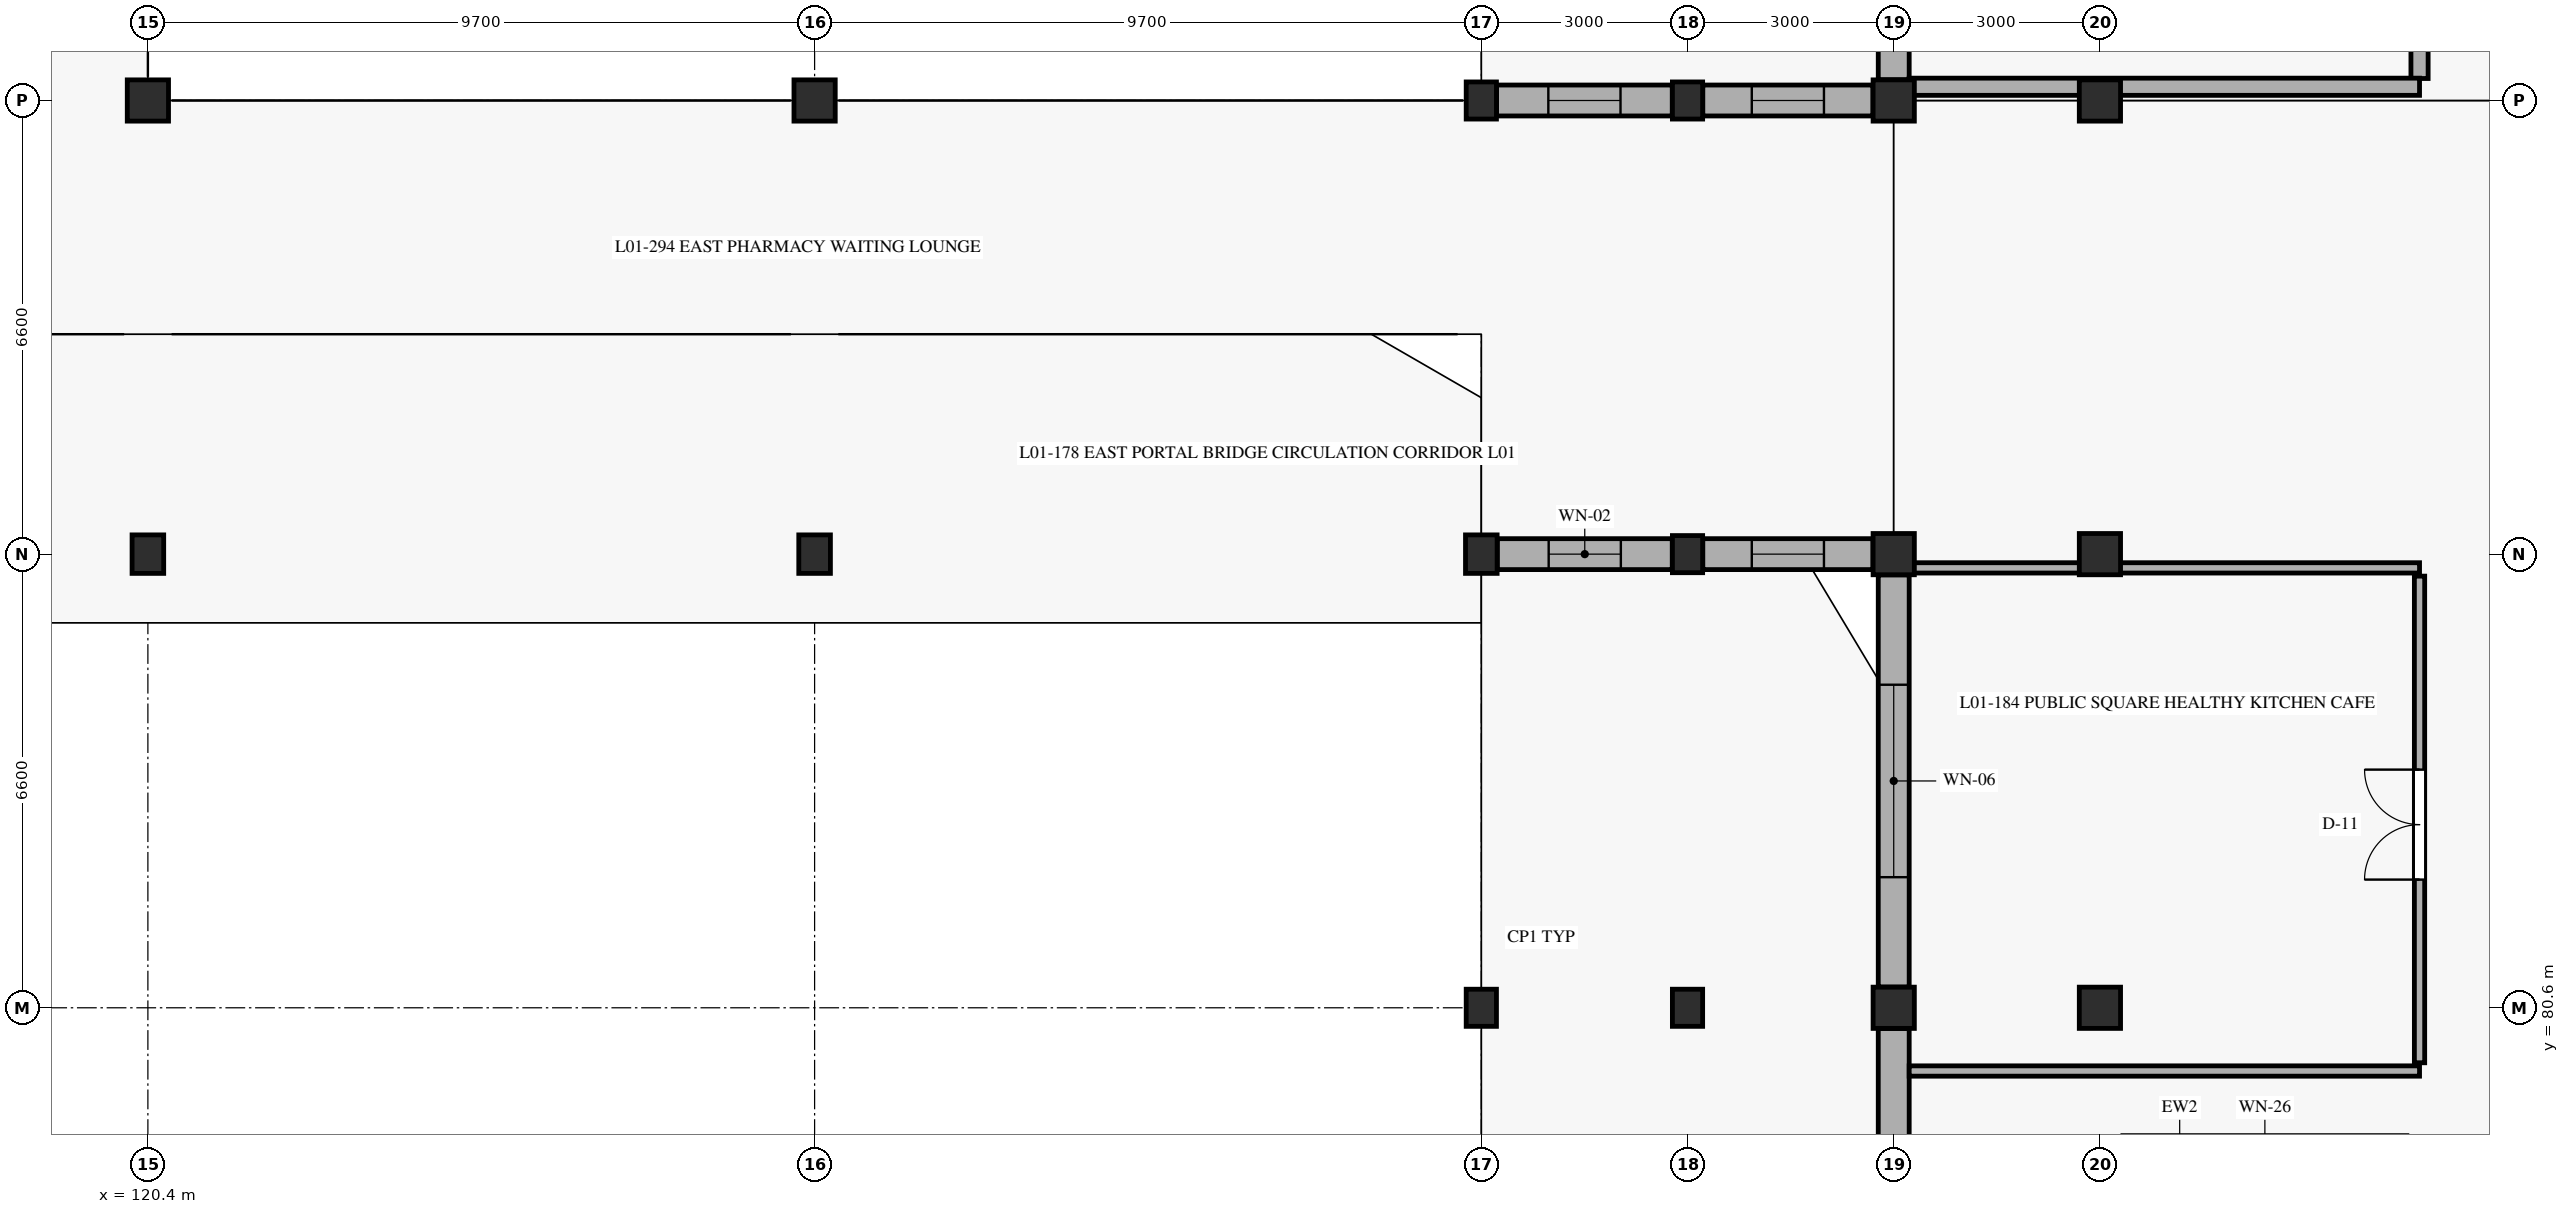
"""IFC4 building model, lengths in metres.
Left out: names, types, materials, properties, quantities, classifications, styles, units other than length and angle.
Written with IfcOpenShell. Run it as: python <this file> out.ifc"""

import sys

from ifc_helpers import new_model, si_unit, direction, frame, frame_2d, origin, origin_with_axes, origin_2d, place, context, subcontext, project, spatial, rectangle, extrude, element, fill, save


model = new_model("IFC4")
c1 = context("Model", 3, precision=1e-05, world=origin(), true_north=direction((0.0, 1.0)))
c2 = subcontext(c1, "Body", "Model", "MODEL_VIEW")
j1 = project(units=[si_unit("LENGTHUNIT", "METRE"), si_unit("PLANEANGLEUNIT", "RADIAN")], contexts=[c1])
p1 = place(None, origin())
s1 = spatial("IfcSite", under=j1, at=p1, CompositionType="ELEMENT")
p2 = place(p1, origin())
s2 = spatial("IfcBuilding", under=s1, at=p2, CompositionType="ELEMENT")
p3 = place(p2, origin())
s3 = spatial("IfcBuildingStorey", under=s2, at=p3, CompositionType="ELEMENT", Elevation=0.0)
p4 = place(p3, frame((120.4, 87.2, 0.0), z_axis=(0.0, 0.0, 1.0), x_axis=(1.0, 0.0, 0.0)))
e1 = element("IfcColumn", 1, at=p4, inside=s3, PredefinedType="COLUMN", context=c2, shape_type="SweptSolid", body=[
    extrude(rectangle(XDim=0.46, YDim=0.56, at=origin_2d()), origin(), (0.0, 0.0, 1.0), 4.8),
])
p5 = place(p3, frame((120.4, 93.8, 0.0), z_axis=(0.0, 0.0, 1.0), x_axis=(1.0, 0.0, 0.0)))
e2 = element("IfcColumn", 2, at=p5, inside=s3, PredefinedType="COLUMN", context=c2, shape_type="SweptSolid", body=[
    extrude(rectangle(XDim=0.6, YDim=0.6, at=origin_2d()), origin(), (0.0, 0.0, 1.0), 4.8),
])
p6 = place(p3, frame((130.1, 87.2, 0.0), z_axis=(0.0, 0.0, 1.0), x_axis=(1.0, 0.0, 0.0)))
e3 = element("IfcColumn", 3, at=p6, inside=s3, PredefinedType="COLUMN", context=c2, shape_type="SweptSolid", body=[
    extrude(rectangle(XDim=0.46, YDim=0.56, at=origin_2d()), origin(), (0.0, 0.0, 1.0), 4.8),
])
p7 = place(p3, frame((130.1, 93.8, 0.0), z_axis=(0.0, 0.0, 1.0), x_axis=(1.0, 0.0, 0.0)))
e4 = element("IfcColumn", 4, at=p7, inside=s3, PredefinedType="COLUMN", context=c2, shape_type="SweptSolid", body=[
    extrude(rectangle(XDim=0.6, YDim=0.6, at=origin_2d()), origin(), (0.0, 0.0, 1.0), 4.8),
])
p8 = place(p3, frame((139.8, 80.6, 0.0), z_axis=(0.0, 0.0, 1.0), x_axis=(1.0, 0.0, 0.0)))
e5 = element("IfcColumn", 5, at=p8, inside=s3, PredefinedType="PILASTER", context=c2, shape_type="SweptSolid", body=[
    extrude(rectangle(XDim=0.44, YDim=0.54, at=origin_2d()), origin(), (0.0, 0.0, 1.0), 4.8),
])
p9 = place(p3, frame((139.8, 87.2, 0.0), z_axis=(0.0, 0.0, 1.0), x_axis=(1.0, 0.0, 0.0)))
e6 = element("IfcColumn", 6, at=p9, inside=s3, PredefinedType="COLUMN", context=c2, shape_type="SweptSolid", body=[
    extrude(rectangle(XDim=0.46, YDim=0.56, at=origin_2d()), origin(), (0.0, 0.0, 1.0), 4.8),
])
for number, where, z_axis, x_axis in (
    (7, (139.8, 93.8, 0.0), (0.0, 0.0, 1.0), (1.0, 0.0, 0.0)),
    (8, (142.8, 80.6, 0.0), (0.0, 0.0, 1.0), (1.0, 0.0, 0.0)),
    (9, (142.8, 87.2, 0.0), (0.0, 0.0, 1.0), (1.0, 0.0, 0.0)),
    (10, (142.8, 93.8, 0.0), (0.0, 0.0, 1.0), (1.0, 0.0, 0.0)),
):
    element("IfcColumn", number, at=place(p3, frame(where, z_axis=z_axis, x_axis=x_axis)), inside=s3, PredefinedType="PILASTER", context=c2, shape_type="SweptSolid", body=[
        extrude(rectangle(XDim=0.44, YDim=0.54, at=origin_2d()), origin(), (0.0, 0.0, 1.0), 4.8),
    ])
for number, where, z_axis, x_axis in (
    (11, (145.8, 80.6, 0.0), (0.0, 0.0, 1.0), (1.0, 0.0, 0.0)),
    (12, (145.8, 87.2, 0.0), (0.0, 0.0, 1.0), (1.0, 0.0, 0.0)),
    (13, (145.8, 93.8, 0.0), (0.0, 0.0, 1.0), (1.0, 0.0, 0.0)),
    (14, (148.8, 80.6, 0.0), (0.0, 0.0, 1.0), (1.0, 0.0, 0.0)),
    (15, (148.8, 87.2, 0.0), (0.0, 0.0, 1.0), (1.0, 0.0, 0.0)),
    (16, (148.8, 93.8, 0.0), (0.0, 0.0, 1.0), (1.0, 0.0, 0.0)),
):
    element("IfcColumn", number, at=place(p3, frame(where, z_axis=z_axis, x_axis=x_axis)), inside=s3, PredefinedType="COLUMN", context=c2, shape_type="SweptSolid", body=[
        extrude(rectangle(XDim=0.6, YDim=0.6, at=origin_2d()), origin(), (0.0, 0.0, 1.0), 4.8),
    ])
p10 = place(p3, frame((145.8, 80.298, 0.0), z_axis=(0.0, 0.0, 1.0), x_axis=(0.0, -1.0, 0.0)))
e17 = element("IfcWall", 17, at=p10, inside=s3, PredefinedType="SOLIDWALL", context=c2, shape_type="SweptSolid", body=[
    extrude(rectangle(XDim=7.796, YDim=0.45, at=frame_2d((3.898, 0.0))), origin(), (0.0, 0.0, 1.0), 4.04),
])
p11 = place(p10, frame((2.968, 0.0, 0.0)))
e18 = element("IfcOpeningElement", 18, at=p11, cuts=e17, PredefinedType="OPENING", context=c2, shape_type="SweptSolid", body=[
    extrude(rectangle(XDim=1.86, YDim=2.5, at=frame_2d((0.93, 1.25))), frame((0.0, 0.235, 0.0), z_axis=(0.0, -1.0, 0.0), x_axis=(1.0, 0.0, 0.0)), (0.0, 0.0, 1.0), 0.47),
])
p12 = place(p3, frame((145.8, 86.898, 0.0), z_axis=(0.0, 0.0, 1.0), x_axis=(0.0, -1.0, 0.0)))
e19 = element("IfcWall", 19, at=p12, inside=s3, PredefinedType="SOLIDWALL", context=c2, shape_type="SweptSolid", body=[
    extrude(rectangle(XDim=5.996, YDim=0.45, at=frame_2d((2.998, 0.0))), origin(), (0.0, 0.0, 1.0), 4.04),
])
p13 = place(p12, frame((1.598, 0.0, 0.6)))
e20 = element("IfcOpeningElement", 20, at=p13, cuts=e19, PredefinedType="OPENING", context=c2, shape_type="SweptSolid", body=[
    extrude(rectangle(XDim=2.8, YDim=2.5, at=frame_2d((1.4, 1.25))), frame((0.0, 0.235, 0.0), z_axis=(0.0, -1.0, 0.0), x_axis=(1.0, 0.0, 0.0)), (0.0, 0.0, 1.0), 0.47),
])
p14 = place(p3, frame((145.8, 100.098, 0.0), z_axis=(0.0, 0.0, 1.0), x_axis=(0.0, -1.0, 0.0)))
e21 = element("IfcWall", 21, at=p14, inside=s3, PredefinedType="SOLIDWALL", context=c2, shape_type="SweptSolid", body=[
    extrude(rectangle(XDim=5.996, YDim=0.45, at=frame_2d((2.998, 0.0))), origin(), (0.0, 0.0, 1.0), 4.04),
])
p15 = place(p14, frame((1.598, 0.0, 0.6)))
e22 = element("IfcOpeningElement", 22, at=p15, cuts=e21, PredefinedType="OPENING", context=c2, shape_type="SweptSolid", body=[
    extrude(rectangle(XDim=2.8, YDim=2.5, at=frame_2d((1.4, 1.25))), frame((0.0, 0.235, 0.0), z_axis=(0.0, -1.0, 0.0), x_axis=(1.0, 0.0, 0.0)), (0.0, 0.0, 1.0), 0.47),
])
p16 = place(p3, frame((140.032, 87.2, 0.0), z_axis=(0.0, 0.0, 1.0), x_axis=(1.0, 0.0, 0.0)))
e23 = element("IfcWall", 23, at=p16, inside=s3, PredefinedType="SOLIDWALL", context=c2, shape_type="SweptSolid", body=[
    extrude(rectangle(XDim=2.546, YDim=0.45, at=frame_2d((1.273, 0.0))), origin(), (0.0, 0.0, 1.0), 4.14),
])
p17 = place(p16, frame((0.748, 0.0, 0.65)))
e24 = element("IfcOpeningElement", 24, at=p17, cuts=e23, PredefinedType="OPENING", context=c2, shape_type="SweptSolid", body=[
    extrude(rectangle(XDim=1.05, YDim=2.2, at=frame_2d((0.525, 1.1))), frame((0.0, 0.235, 0.0), z_axis=(0.0, -1.0, 0.0), x_axis=(1.0, 0.0, 0.0)), (0.0, 0.0, 1.0), 0.47),
])
p18 = place(p3, frame((142.578, 93.8, 0.0), z_axis=(0.0, 0.0, 1.0), x_axis=(-1.0, 0.0, 0.0)))
e25 = element("IfcWall", 25, at=p18, inside=s3, PredefinedType="SOLIDWALL", context=c2, shape_type="SweptSolid", body=[
    extrude(rectangle(XDim=2.556, YDim=0.45, at=frame_2d((1.278, 0.0))), origin(), (0.0, 0.0, 1.0), 4.14),
])
p19 = place(p18, frame((0.753, 0.0, 0.85)))
e26 = element("IfcOpeningElement", 26, at=p19, cuts=e25, PredefinedType="OPENING", context=c2, shape_type="SweptSolid", body=[
    extrude(rectangle(XDim=1.05, YDim=2.2, at=frame_2d((0.525, 1.1))), frame((0.0, 0.235, 0.0), z_axis=(0.0, -1.0, 0.0), x_axis=(1.0, 0.0, 0.0)), (0.0, 0.0, 1.0), 0.47),
])
p20 = place(p3, frame((143.022, 87.2, 0.0), z_axis=(0.0, 0.0, 1.0), x_axis=(1.0, 0.0, 0.0)))
e27 = element("IfcWall", 27, at=p20, inside=s3, PredefinedType="SOLIDWALL", context=c2, shape_type="SweptSolid", body=[
    extrude(rectangle(XDim=2.476, YDim=0.45, at=frame_2d((1.238, 0.0))), origin(), (0.0, 0.0, 1.0), 4.14),
])
p21 = place(p20, frame((0.713, 0.0, 0.65)))
e28 = element("IfcOpeningElement", 28, at=p21, cuts=e27, PredefinedType="OPENING", context=c2, shape_type="SweptSolid", body=[
    extrude(rectangle(XDim=1.05, YDim=2.2, at=frame_2d((0.525, 1.1))), frame((0.0, 0.235, 0.0), z_axis=(0.0, -1.0, 0.0), x_axis=(1.0, 0.0, 0.0)), (0.0, 0.0, 1.0), 0.47),
])
p22 = place(p3, frame((145.498, 93.8, 0.0), z_axis=(0.0, 0.0, 1.0), x_axis=(-1.0, 0.0, 0.0)))
e29 = element("IfcWall", 29, at=p22, inside=s3, PredefinedType="SOLIDWALL", context=c2, shape_type="SweptSolid", body=[
    extrude(rectangle(XDim=2.476, YDim=0.45, at=frame_2d((1.238, 0.0))), origin(), (0.0, 0.0, 1.0), 4.14),
])
p23 = place(p22, frame((0.713, 0.0, 0.85)))
e30 = element("IfcOpeningElement", 30, at=p23, cuts=e29, PredefinedType="OPENING", context=c2, shape_type="SweptSolid", body=[
    extrude(rectangle(XDim=1.05, YDim=2.2, at=frame_2d((0.525, 1.1))), frame((0.0, 0.235, 0.0), z_axis=(0.0, -1.0, 0.0), x_axis=(1.0, 0.0, 0.0)), (0.0, 0.0, 1.0), 0.47),
])
p24 = place(p3, frame((153.45, 79.8, 0.0), z_axis=(0.0, 0.0, 1.0), x_axis=(0.0, 1.0, 0.0)))
e31 = element("IfcWall", 31, at=p24, inside=s3, PredefinedType="PARTITIONING", context=c2, shape_type="SweptSolid", body=[
    extrude(rectangle(XDim=7.08, YDim=0.15, at=frame_2d((3.54, 0.0))), origin(), (0.0, 0.0, 1.0), 4.095),
])
p25 = place(p24, frame((2.665, 0.0, 0.0)))
e32 = element("IfcOpeningElement", 32, at=p25, cuts=e31, PredefinedType="OPENING", context=c2, shape_type="SweptSolid", body=[
    extrude(rectangle(XDim=1.6, YDim=2.25, at=frame_2d((0.8, 1.125))), frame((0.0, 0.085, 0.0), z_axis=(0.0, -1.0, 0.0), x_axis=(1.0, 0.0, 0.0)), (0.0, 0.0, 1.0), 0.17),
])
for number, where, z_axis, x_axis in (
    (33, (146.025, 79.68, 0.0), (0.0, 0.0, 1.0), (1.0, 0.0, 0.0)),
    (34, (146.025, 87.0, 0.0), (0.0, 0.0, 1.0), (1.0, 0.0, 0.0)),
):
    element("IfcWall", number, at=place(p3, frame(where, z_axis=z_axis, x_axis=x_axis)), inside=s3, PredefinedType="PARTITIONING", context=c2, shape_type="SweptSolid", body=[
        extrude(rectangle(XDim=7.425, YDim=0.15, at=frame_2d((3.712, 0.0))), origin(), (0.0, 0.0, 1.0), 4.035),
    ])
p26 = place(p3, frame((153.45, 94.12, 0.0), z_axis=(0.0, 0.0, 1.0), x_axis=(0.0, 1.0, 0.0)))
e35 = element("IfcWall", 35, at=p26, inside=s3, PredefinedType="SOLIDWALL", context=c2, shape_type="SweptSolid", body=[
    extrude(rectangle(XDim=10.5, YDim=0.25, at=frame_2d((5.25, 0.0))), origin(), (0.0, 0.0, 1.0), 4.095),
])
p27 = place(p26, frame((4.635, 0.0, 0.0)))
e36 = element("IfcOpeningElement", 36, at=p27, cuts=e35, PredefinedType="OPENING", context=c2, shape_type="SweptSolid", body=[
    extrude(rectangle(XDim=1.08, YDim=2.2, at=frame_2d((0.54, 1.1))), frame((0.0, 0.135, 0.0), z_axis=(0.0, -1.0, 0.0), x_axis=(1.0, 0.0, 0.0)), (0.0, 0.0, 1.0), 0.27),
])
p28 = place(p3, frame((146.025, 94.0, 0.0), z_axis=(0.0, 0.0, 1.0), x_axis=(1.0, 0.0, 0.0)))
e37 = element("IfcWall", 37, at=p28, inside=s3, PredefinedType="SOLIDWALL", context=c2, shape_type="SweptSolid", body=[
    extrude(rectangle(XDim=7.425, YDim=0.25, at=frame_2d((3.712, 0.0))), origin(), (0.0, 0.0, 1.0), 4.035),
])
p29 = place(p13, origin_with_axes())
e38 = element("IfcWindow", 38, at=p29, inside=s3, PartitioningType="SINGLE_PANEL", PredefinedType="WINDOW", context=c2, shape_type="SweptSolid", body=[
    extrude(rectangle(XDim=2.8, YDim=2.5, at=frame_2d((1.4, 1.25))), frame((0.0, 0.03, 0.0), z_axis=(0.0, -1.0, 0.0), x_axis=(1.0, 0.0, 0.0)), (0.0, 0.0, 1.0), 0.06),
])
fill(e20, e38)
p30 = place(p17, origin_with_axes())
e39 = element("IfcWindow", 39, at=p30, inside=s3, PartitioningType="SINGLE_PANEL", PredefinedType="WINDOW", context=c2, shape_type="SweptSolid", body=[
    extrude(rectangle(XDim=1.05, YDim=2.2, at=frame_2d((0.525, 1.1))), frame((0.0, 0.03, 0.0), z_axis=(0.0, -1.0, 0.0), x_axis=(1.0, 0.0, 0.0)), (0.0, 0.0, 1.0), 0.06),
])
fill(e24, e39)
p31 = place(p19, origin_with_axes())
e40 = element("IfcWindow", 40, at=p31, inside=s3, PartitioningType="SINGLE_PANEL", PredefinedType="WINDOW", context=c2, shape_type="SweptSolid", body=[
    extrude(rectangle(XDim=1.05, YDim=2.2, at=frame_2d((0.525, 1.1))), frame((0.0, 0.03, 0.0), z_axis=(0.0, -1.0, 0.0), x_axis=(1.0, 0.0, 0.0)), (0.0, 0.0, 1.0), 0.06),
])
fill(e26, e40)
p32 = place(p21, origin_with_axes())
e41 = element("IfcWindow", 41, at=p32, inside=s3, PartitioningType="SINGLE_PANEL", PredefinedType="WINDOW", context=c2, shape_type="SweptSolid", body=[
    extrude(rectangle(XDim=1.05, YDim=2.2, at=frame_2d((0.525, 1.1))), frame((0.0, 0.03, 0.0), z_axis=(0.0, -1.0, 0.0), x_axis=(1.0, 0.0, 0.0)), (0.0, 0.0, 1.0), 0.06),
])
fill(e28, e41)
p33 = place(p23, origin_with_axes())
e42 = element("IfcWindow", 42, at=p33, inside=s3, PartitioningType="SINGLE_PANEL", PredefinedType="WINDOW", context=c2, shape_type="SweptSolid", body=[
    extrude(rectangle(XDim=1.05, YDim=2.2, at=frame_2d((0.525, 1.1))), frame((0.0, 0.03, 0.0), z_axis=(0.0, -1.0, 0.0), x_axis=(1.0, 0.0, 0.0)), (0.0, 0.0, 1.0), 0.06),
])
fill(e30, e42)
p34 = place(p25, origin_with_axes())
e43 = element("IfcDoor", 43, at=p34, inside=s3, OperationType="DOUBLE_DOOR_SINGLE_SWING", PredefinedType="DOOR", context=c2, shape_type="SweptSolid", body=[
    extrude(rectangle(XDim=1.6, YDim=2.25, at=frame_2d((0.8, 1.125))), frame((0.0, 0.025, 0.0), z_axis=(0.0, -1.0, 0.0), x_axis=(1.0, 0.0, 0.0)), (0.0, 0.0, 1.0), 0.05),
])
fill(e32, e43)
save(model, sys.argv[1])
